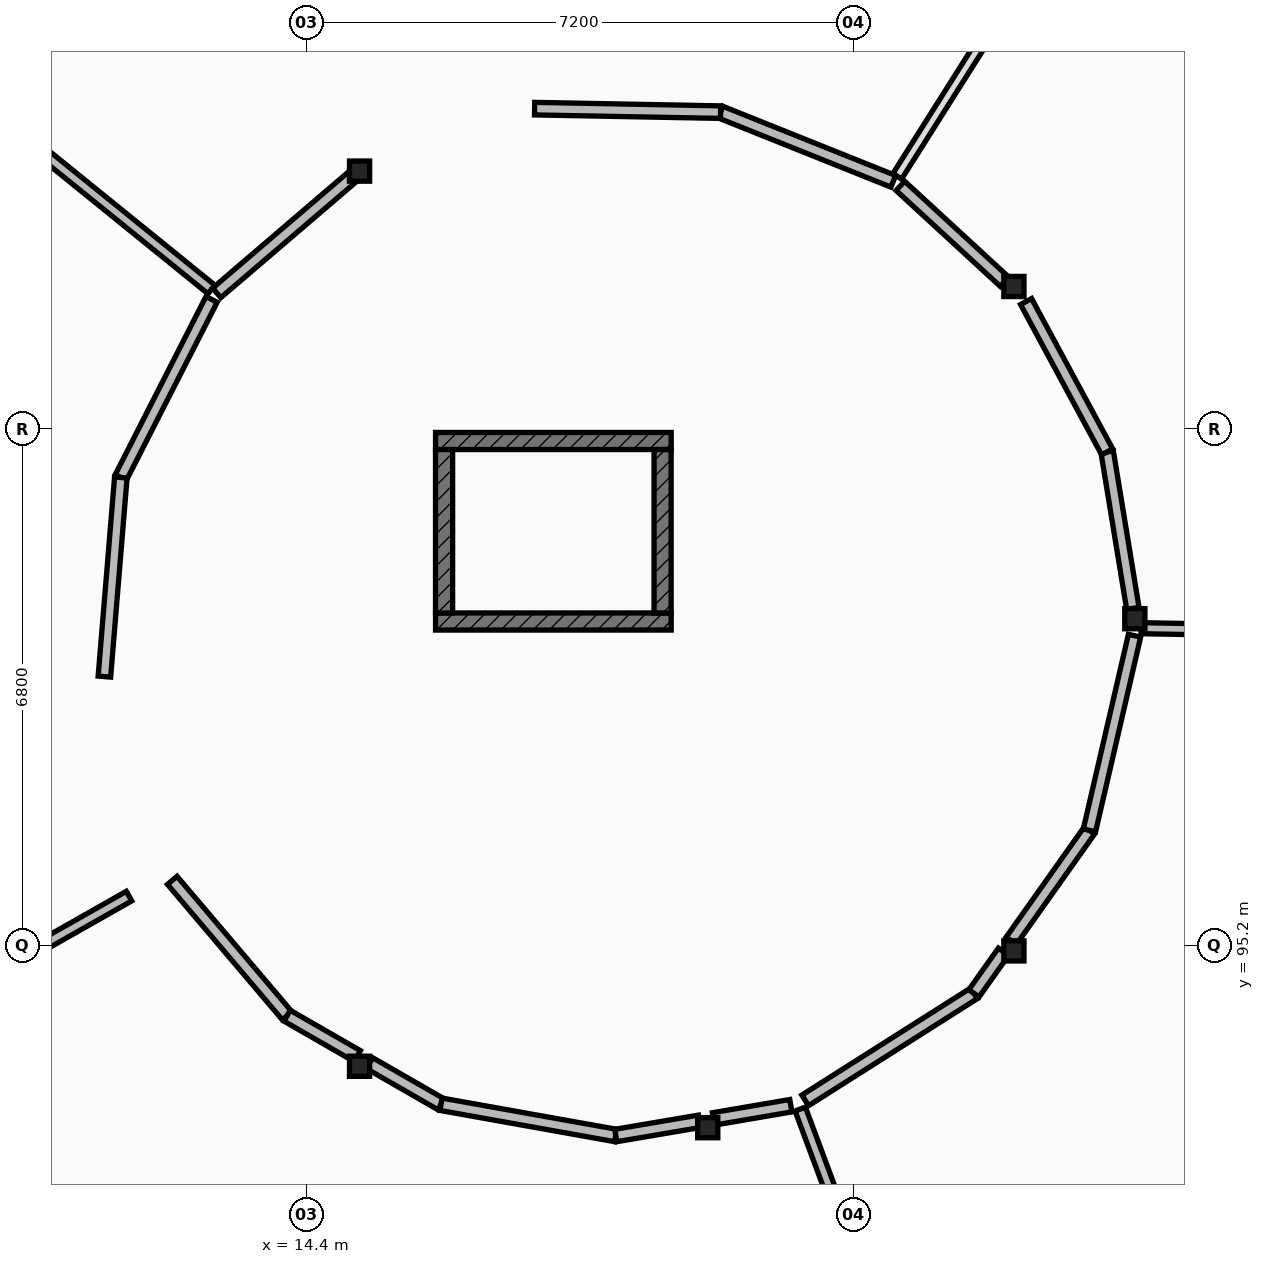
"""IFC4 building model, lengths in metres.
Left out: names, types, materials, properties, quantities, classifications, styles, units other than length and angle.
Written with IfcOpenShell. Run it as: python <this file> out.ifc"""

import sys

from ifc_helpers import new_model, si_unit, direction, frame, frame_2d, origin, origin_2d, place, context, subcontext, project, spatial, rectangle, extrude, element, fill, save


model = new_model("IFC4")
c1 = context("Model", 3, precision=1e-05, world=origin(), true_north=direction((0.0, 1.0)))
c2 = subcontext(c1, "Body", "Model", "MODEL_VIEW")
j1 = project(units=[si_unit("LENGTHUNIT", "METRE"), si_unit("PLANEANGLEUNIT", "RADIAN")], contexts=[c1])
p1 = place(None, origin())
s1 = spatial("IfcSite", under=j1, at=p1, CompositionType="ELEMENT")
p2 = place(p1, origin())
s2 = spatial("IfcBuilding", under=s1, at=p2, CompositionType="ELEMENT")
p3 = place(p2, frame((0.0, 0.0, 21.35)))
s3 = spatial("IfcBuildingStorey", under=s2, at=p3, CompositionType="ELEMENT", Elevation=21.35)
for number, where, z_axis, x_axis in (
    (1, (25.3, 99.5, 0.0), (0.0, 0.0, 1.0), (1.0, 0.0, 0.0)),
    (2, (23.709, 103.871, 0.0), (0.0, 0.0, 1.0), (1.0, 0.0, 0.0)),
    (3, (15.1, 105.389, 0.0), (0.0, 0.0, 1.0), (1.0, 0.0, 0.0)),
    (4, (15.1, 93.611, 0.0), (0.0, 0.0, 1.0), (1.0, 0.0, 0.0)),
    (5, (19.681, 92.803, 0.0), (0.0, 0.0, 1.0), (1.0, 0.0, 0.0)),
    (6, (23.709, 95.129, 0.0), (0.0, 0.0, 1.0), (1.0, 0.0, 0.0)),
):
    element("IfcColumn", number, at=place(p3, frame(where, z_axis=z_axis, x_axis=x_axis)), inside=s3, PredefinedType="COLUMN", context=c2, shape_type="SweptSolid", body=[
        extrude(rectangle(XDim=0.265, YDim=0.265, at=origin_2d()), origin(), (0.0, 0.0, 1.0), 4.2),
    ])
p4 = place(p3, frame((16.1, 99.463, 0.0), z_axis=(0.0, 0.0, 1.0), x_axis=(1.0, 0.0, 0.0)))
e7 = element("IfcWall", 7, at=p4, inside=s3, PredefinedType="SHEAR", context=c2, shape_type="SweptSolid", body=[
    extrude(rectangle(XDim=3.1, YDim=0.225, at=frame_2d((1.55, 0.0))), origin(), (0.0, 0.0, 1.0), 3.96),
])
p5 = place(p4, frame((0.95, 0.0, 0.0)))
e8 = element("IfcOpeningElement", 8, at=p5, cuts=e7, PredefinedType="OPENING", context=c2, shape_type="SweptSolid", body=[
    extrude(rectangle(XDim=1.2, YDim=2.2, at=frame_2d((0.6, 1.1))), frame((0.0, 0.123, 0.0), z_axis=(0.0, -1.0, 0.0), x_axis=(1.0, 0.0, 0.0)), (0.0, 0.0, 1.0), 0.245),
])
p6 = place(p3, frame((16.1, 101.838, 0.0), z_axis=(0.0, 0.0, 1.0), x_axis=(1.0, 0.0, 0.0)))
e9 = element("IfcWall", 9, at=p6, inside=s3, PredefinedType="SHEAR", context=c2, shape_type="SweptSolid", body=[
    extrude(rectangle(XDim=3.1, YDim=0.225, at=frame_2d((1.55, 0.0))), origin(), (0.0, 0.0, 1.0), 3.96),
])
for number, where, z_axis, x_axis in (
    (10, (16.212, 99.575, 0.0), (0.0, 0.0, 1.0), (0.0, 1.0, 0.0)),
    (11, (19.087, 99.575, 0.0), (0.0, 0.0, 1.0), (0.0, 1.0, 0.0)),
):
    element("IfcWall", number, at=place(p3, frame(where, z_axis=z_axis, x_axis=x_axis)), inside=s3, PredefinedType="SHEAR", context=c2, shape_type="SweptSolid", body=[
        extrude(rectangle(XDim=2.15, YDim=0.225, at=frame_2d((1.075, 0.0))), origin(), (0.0, 0.0, 1.0), 3.96),
    ])
p7 = place(p3, frame((13.151, 103.832, 0.0), z_axis=(0.0, 0.0, 1.0), x_axis=(-0.777240280244, 0.629203899198, 0.0)))
e12 = element("IfcWall", 12, at=p7, inside=s3, PredefinedType="PARTITIONING", context=c2, shape_type="SweptSolid", body=[
    extrude(rectangle(XDim=3.716, YDim=0.145, at=frame_2d((1.858, 0.0))), origin(), (0.0, 0.0, 1.0), 3.279),
])
p8 = place(p3, frame((12.067, 95.85, 0.0), z_axis=(0.0, 0.0, 1.0), x_axis=(-0.869678824808, -0.493618011909, 0.0)))
e13 = element("IfcWall", 13, at=p8, inside=s3, PredefinedType="PARTITIONING", context=c2, shape_type="SweptSolid", body=[
    extrude(rectangle(XDim=4.395, YDim=0.145, at=frame_2d((2.197, 0.0))), origin(), (0.0, 0.0, 1.0), 3.279),
])
p9 = place(p3, frame((20.898, 93.048, 0.0), z_axis=(0.0, 0.0, 1.0), x_axis=(0.348428829985, -0.937335239088, 0.0)))
e14 = element("IfcWall", 14, at=p9, inside=s3, PredefinedType="PARTITIONING", context=c2, shape_type="SweptSolid", body=[
    extrude(rectangle(XDim=4.908, YDim=0.145, at=frame_2d((2.454, 0.0))), origin(), (0.0, 0.0, 1.0), 3.279),
])
p10 = place(p3, frame((25.382, 99.375, 0.0), z_axis=(0.0, 0.0, 1.0), x_axis=(0.999834471554, -0.01819421588, 0.0)))
e15 = element("IfcWall", 15, at=p10, inside=s3, PredefinedType="PARTITIONING", context=c2, shape_type="SweptSolid", body=[
    extrude(rectangle(XDim=4.898, YDim=0.145, at=frame_2d((2.449, 0.0))), origin(), (0.0, 0.0, 1.0), 3.279),
])
p11 = place(p3, frame((22.174, 105.32, 0.0), z_axis=(0.0, 0.0, 1.0), x_axis=(0.533929049937, 0.845529283723, 0.0)))
e16 = element("IfcWall", 16, at=p11, inside=s3, PredefinedType="PLUMBINGWALL", context=c2, shape_type="SweptSolid", body=[
    extrude(rectangle(XDim=4.884, YDim=0.135, at=frame_2d((2.442, 0.0))), origin(), (0.0, 0.0, 1.0), 3.279),
])
p12 = place(p3, frame((13.153, 103.701, 0.0), z_axis=(0.0, 0.0, 1.0), x_axis=(-0.454070411611, -0.890965802542, 0.0)))
e17 = element("IfcWall", 17, at=p12, inside=s3, PredefinedType="PARTITIONING", context=c2, shape_type="SweptSolid", body=[
    extrude(rectangle(XDim=2.63, YDim=0.165, at=frame_2d((1.315, 0.0))), origin(), (0.0, 0.0, 1.0), 3.279),
])
p13 = place(p12, frame((0.854, 0.0, 0.0)))
e18 = element("IfcOpeningElement", 18, at=p13, cuts=e17, PredefinedType="OPENING", context=c2, shape_type="SweptSolid", body=[
    extrude(rectangle(XDim=0.92, YDim=2.24, at=frame_2d((0.46, 1.12))), frame((0.0, 0.093, 0.0), z_axis=(0.0, -1.0, 0.0), x_axis=(1.0, 0.0, 0.0)), (0.0, 0.0, 1.0), 0.185),
])
p14 = place(p3, frame((11.959, 101.358, 0.0), z_axis=(0.0, 0.0, 1.0), x_axis=(-0.082192301973, -0.996616488674, 0.0)))
e19 = element("IfcWall", 19, at=p14, inside=s3, PredefinedType="PARTITIONING", context=c2, shape_type="SweptSolid", body=[
    extrude(rectangle(XDim=2.629, YDim=0.165, at=frame_2d((1.314, 0.0))), origin(), (0.0, 0.0, 1.0), 3.279),
])
p15 = place(p3, frame((12.636, 96.057, 0.0), z_axis=(0.0, 0.0, 1.0), x_axis=(0.646935088341, -0.762545075044, 0.0)))
e20 = element("IfcWall", 20, at=p15, inside=s3, PredefinedType="PARTITIONING", context=c2, shape_type="SweptSolid", body=[
    extrude(rectangle(XDim=2.336, YDim=0.165, at=frame_2d((1.168, 0.0))), origin(), (0.0, 0.0, 1.0), 3.279),
])
p16 = place(p15, frame((0.678, 0.0, 0.0)))
e21 = element("IfcOpeningElement", 21, at=p16, cuts=e20, PredefinedType="OPENING", context=c2, shape_type="SweptSolid", body=[
    extrude(rectangle(XDim=0.98, YDim=2.24, at=frame_2d((0.49, 1.12))), frame((0.0, 0.093, 0.0), z_axis=(0.0, -1.0, 0.0), x_axis=(1.0, 0.0, 0.0)), (0.0, 0.0, 1.0), 0.185),
])
p17 = place(p3, frame((14.147, 94.276, 0.0), z_axis=(0.0, 0.0, 1.0), x_axis=(0.866913733882, -0.498458200862, 0.0)))
e22 = element("IfcWall", 22, at=p17, inside=s3, PredefinedType="PARTITIONING", context=c2, shape_type="SweptSolid", body=[
    extrude(rectangle(XDim=1.065, YDim=0.165, at=frame_2d((0.532, 0.0))), origin(), (0.0, 0.0, 1.0), 3.279),
])
p18 = place(p3, frame((15.231, 93.652, 0.0), z_axis=(0.0, 0.0, 1.0), x_axis=(0.866967036006, -0.498365486846, 0.0)))
e23 = element("IfcWall", 23, at=p18, inside=s3, PredefinedType="PARTITIONING", context=c2, shape_type="SweptSolid", body=[
    extrude(rectangle(XDim=1.086, YDim=0.165, at=frame_2d((0.543, 0.0))), origin(), (0.0, 0.0, 1.0), 3.279),
])
p19 = place(p3, frame((16.172, 93.111, 0.0), z_axis=(0.0, 0.0, 1.0), x_axis=(0.984381019853, -0.176051150959, 0.0)))
e24 = element("IfcWall", 24, at=p19, inside=s3, PredefinedType="PARTITIONING", context=c2, shape_type="SweptSolid", body=[
    extrude(rectangle(XDim=2.335, YDim=0.165, at=frame_2d((1.167, 0.0))), origin(), (0.0, 0.0, 1.0), 3.279),
])
p20 = place(p3, frame((18.471, 92.7, 0.0), z_axis=(0.0, 0.0, 1.0), x_axis=(0.985905603064, 0.167302545846, 0.0)))
e25 = element("IfcWall", 25, at=p20, inside=s3, PredefinedType="PARTITIONING", context=c2, shape_type="SweptSolid", body=[
    extrude(rectangle(XDim=1.118, YDim=0.165, at=frame_2d((0.559, 0.0))), origin(), (0.0, 0.0, 1.0), 3.279),
])
p21 = place(p3, frame((19.756, 92.918, 0.0), z_axis=(0.0, 0.0, 1.0), x_axis=(0.98568855246, 0.168576622189, 0.0)))
e26 = element("IfcWall", 26, at=p21, inside=s3, PredefinedType="PARTITIONING", context=c2, shape_type="SweptSolid", body=[
    extrude(rectangle(XDim=1.033, YDim=0.165, at=frame_2d((0.516, 0.0))), origin(), (0.0, 0.0, 1.0), 3.279),
])
p22 = place(p3, frame((20.963, 93.162, 0.0), z_axis=(0.0, 0.0, 1.0), x_axis=(0.844505505294, 0.535546871457, 0.0)))
e27 = element("IfcWall", 27, at=p22, inside=s3, PredefinedType="PARTITIONING", context=c2, shape_type="SweptSolid", body=[
    extrude(rectangle(XDim=2.629, YDim=0.165, at=frame_2d((1.314, 0.0))), origin(), (0.0, 0.0, 1.0), 3.279),
])
p23 = place(p22, frame((0.804, 0.0, 0.0)))
e28 = element("IfcOpeningElement", 28, at=p23, cuts=e27, PredefinedType="OPENING", context=c2, shape_type="SweptSolid", body=[
    extrude(rectangle(XDim=1.02, YDim=2.26, at=frame_2d((0.51, 1.13))), frame((0.0, 0.093, 0.0), z_axis=(0.0, -1.0, 0.0), x_axis=(1.0, 0.0, 0.0)), (0.0, 0.0, 1.0), 0.185),
])
p24 = place(p3, frame((23.183, 94.57, 0.0), z_axis=(0.0, 0.0, 1.0), x_axis=(0.578863935342, 0.815424149974, 0.0)))
e29 = element("IfcWall", 29, at=p24, inside=s3, PredefinedType="PARTITIONING", context=c2, shape_type="SweptSolid", body=[
    extrude(rectangle(XDim=0.672, YDim=0.165, at=frame_2d((0.336, 0.0))), origin(), (0.0, 0.0, 1.0), 3.279),
])
p25 = place(p3, frame((23.674, 95.262, 0.0), z_axis=(0.0, 0.0, 1.0), x_axis=(0.577834707515, 0.816153815645, 0.0)))
e30 = element("IfcWall", 30, at=p25, inside=s3, PredefinedType="PARTITIONING", context=c2, shape_type="SweptSolid", body=[
    extrude(rectangle(XDim=1.781, YDim=0.165, at=frame_2d((0.89, 0.0))), origin(), (0.0, 0.0, 1.0), 3.279),
])
p26 = place(p3, frame((24.703, 96.715, 0.0), z_axis=(0.0, 0.0, 1.0), x_axis=(0.225605611858, 0.974218716664, 0.0)))
e31 = element("IfcWall", 31, at=p26, inside=s3, PredefinedType="PARTITIONING", context=c2, shape_type="SweptSolid", body=[
    extrude(rectangle(XDim=2.629, YDim=0.165, at=frame_2d((1.314, 0.0))), origin(), (0.0, 0.0, 1.0), 3.279),
])
p27 = place(p3, frame((25.274, 99.635, 0.0), z_axis=(0.0, 0.0, 1.0), x_axis=(-0.161857175328, 0.986814194666, 0.0)))
e32 = element("IfcWall", 32, at=p27, inside=s3, PredefinedType="PARTITIONING", context=c2, shape_type="SweptSolid", body=[
    extrude(rectangle(XDim=2.088, YDim=0.165, at=frame_2d((1.044, 0.0))), origin(), (0.0, 0.0, 1.0), 3.279),
])
p28 = place(p27, frame((0.514, 0.0, 0.0)))
e33 = element("IfcOpeningElement", 33, at=p28, cuts=e32, PredefinedType="OPENING", context=c2, shape_type="SweptSolid", body=[
    extrude(rectangle(XDim=1.06, YDim=2.26, at=frame_2d((0.53, 1.13))), frame((0.0, 0.093, 0.0), z_axis=(0.0, -1.0, 0.0), x_axis=(1.0, 0.0, 0.0)), (0.0, 0.0, 1.0), 0.185),
])
p29 = place(p3, frame((24.936, 101.695, 0.0), z_axis=(0.0, 0.0, 1.0), x_axis=(-0.474805741817, 0.880090624617, 0.0)))
e34 = element("IfcWall", 34, at=p29, inside=s3, PredefinedType="PARTITIONING", context=c2, shape_type="SweptSolid", body=[
    extrude(rectangle(XDim=2.248, YDim=0.165, at=frame_2d((1.124, 0.0))), origin(), (0.0, 0.0, 1.0), 3.279),
])
p30 = place(p3, frame((23.586, 103.933, 0.0), z_axis=(0.0, 0.0, 1.0), x_axis=(-0.735722058644, 0.67728358346, 0.0)))
e35 = element("IfcWall", 35, at=p30, inside=s3, PredefinedType="PARTITIONING", context=c2, shape_type="SweptSolid", body=[
    extrude(rectangle(XDim=1.863, YDim=0.165, at=frame_2d((0.932, 0.0))), origin(), (0.0, 0.0, 1.0), 3.279),
])
p31 = place(p3, frame((22.122, 105.255, 0.0), z_axis=(0.0, 0.0, 1.0), x_axis=(-0.928283943148, 0.371872183544, 0.0)))
e36 = element("IfcWall", 36, at=p31, inside=s3, PredefinedType="PARTITIONING", context=c2, shape_type="SweptSolid", body=[
    extrude(rectangle(XDim=2.448, YDim=0.165, at=frame_2d((1.224, 0.0))), origin(), (0.0, 0.0, 1.0), 3.279),
])
p32 = place(p31, frame((0.754, 0.0, 0.0)))
e37 = element("IfcOpeningElement", 37, at=p32, cuts=e36, PredefinedType="OPENING", context=c2, shape_type="SweptSolid", body=[
    extrude(rectangle(XDim=0.94, YDim=2.1, at=frame_2d((0.47, 1.05))), frame((0.0, 0.093, 0.0), z_axis=(0.0, -1.0, 0.0), x_axis=(1.0, 0.0, 0.0)), (0.0, 0.0, 1.0), 0.185),
])
p33 = place(p3, frame((19.85, 106.165, 0.0), z_axis=(0.0, 0.0, 1.0), x_axis=(-0.999824136519, 0.018753560577, 0.0)))
e38 = element("IfcWall", 38, at=p33, inside=s3, PredefinedType="PARTITIONING", context=c2, shape_type="SweptSolid", body=[
    extrude(rectangle(XDim=2.448, YDim=0.165, at=frame_2d((1.224, 0.0))), origin(), (0.0, 0.0, 1.0), 3.279),
])
p34 = place(p3, frame((14.993, 105.303, 0.0), z_axis=(0.0, 0.0, 1.0), x_axis=(-0.759884425371, -0.650058197455, 0.0)))
e39 = element("IfcWall", 39, at=p34, inside=s3, PredefinedType="PARTITIONING", context=c2, shape_type="SweptSolid", body=[
    extrude(rectangle(XDim=2.332, YDim=0.165, at=frame_2d((1.166, 0.0))), origin(), (0.0, 0.0, 1.0), 3.279),
])
p35 = place(p34, frame((0.676, 0.0, 0.0)))
e40 = element("IfcOpeningElement", 40, at=p35, cuts=e39, PredefinedType="OPENING", context=c2, shape_type="SweptSolid", body=[
    extrude(rectangle(XDim=0.98, YDim=2.1, at=frame_2d((0.49, 1.05))), frame((0.0, 0.093, 0.0), z_axis=(0.0, -1.0, 0.0), x_axis=(1.0, 0.0, 0.0)), (0.0, 0.0, 1.0), 0.185),
])
p36 = place(p5, origin())
e41 = element("IfcDoor", 41, at=p36, inside=s3, OperationType="DOUBLE_DOOR_SLIDING", PredefinedType="DOOR", context=c2, shape_type="SweptSolid", body=[
    extrude(rectangle(XDim=1.2, YDim=2.2, at=frame_2d((0.6, 1.1))), frame((0.0, 0.025, 0.0), z_axis=(0.0, -1.0, 0.0), x_axis=(1.0, 0.0, 0.0)), (0.0, 0.0, 1.0), 0.05),
])
fill(e8, e41)
p37 = place(p13, origin())
e42 = element("IfcDoor", 42, at=p37, inside=s3, OperationType="SINGLE_SWING_LEFT", PredefinedType="DOOR", context=c2, shape_type="SweptSolid", body=[
    extrude(rectangle(XDim=0.92, YDim=2.24, at=frame_2d((0.46, 1.12))), frame((0.0, 0.025, 0.0), z_axis=(0.0, -1.0, 0.0), x_axis=(1.0, 0.0, 0.0)), (0.0, 0.0, 1.0), 0.05),
])
fill(e18, e42)
p38 = place(p16, origin())
e43 = element("IfcDoor", 43, at=p38, inside=s3, OperationType="SINGLE_SWING_RIGHT", PredefinedType="DOOR", context=c2, shape_type="SweptSolid", body=[
    extrude(rectangle(XDim=0.98, YDim=2.24, at=frame_2d((0.49, 1.12))), frame((0.0, 0.025, 0.0), z_axis=(0.0, -1.0, 0.0), x_axis=(1.0, 0.0, 0.0)), (0.0, 0.0, 1.0), 0.05),
])
fill(e21, e43)
p39 = place(p23, origin())
e44 = element("IfcDoor", 44, at=p39, inside=s3, OperationType="SINGLE_SWING_LEFT", PredefinedType="DOOR", context=c2, shape_type="SweptSolid", body=[
    extrude(rectangle(XDim=1.02, YDim=2.26, at=frame_2d((0.51, 1.13))), frame((0.0, 0.025, 0.0), z_axis=(0.0, -1.0, 0.0), x_axis=(1.0, 0.0, 0.0)), (0.0, 0.0, 1.0), 0.05),
])
fill(e28, e44)
p40 = place(p28, origin())
e45 = element("IfcDoor", 45, at=p40, inside=s3, OperationType="SINGLE_SWING_RIGHT", PredefinedType="DOOR", context=c2, shape_type="SweptSolid", body=[
    extrude(rectangle(XDim=1.06, YDim=2.26, at=frame_2d((0.53, 1.13))), frame((0.0, 0.025, 0.0), z_axis=(0.0, -1.0, 0.0), x_axis=(1.0, 0.0, 0.0)), (0.0, 0.0, 1.0), 0.05),
])
fill(e33, e45)
p41 = place(p32, origin())
e46 = element("IfcDoor", 46, at=p41, inside=s3, OperationType="SINGLE_SWING_LEFT", PredefinedType="DOOR", context=c2, shape_type="SweptSolid", body=[
    extrude(rectangle(XDim=0.94, YDim=2.1, at=frame_2d((0.47, 1.05))), frame((0.0, 0.025, 0.0), z_axis=(0.0, -1.0, 0.0), x_axis=(1.0, 0.0, 0.0)), (0.0, 0.0, 1.0), 0.05),
])
fill(e37, e46)
p42 = place(p35, origin())
e47 = element("IfcDoor", 47, at=p42, inside=s3, OperationType="SINGLE_SWING_RIGHT", PredefinedType="DOOR", context=c2, shape_type="SweptSolid", body=[
    extrude(rectangle(XDim=0.98, YDim=2.1, at=frame_2d((0.49, 1.05))), frame((0.0, 0.025, 0.0), z_axis=(0.0, -1.0, 0.0), x_axis=(1.0, 0.0, 0.0)), (0.0, 0.0, 1.0), 0.05),
])
fill(e40, e47)
save(model, sys.argv[1])
